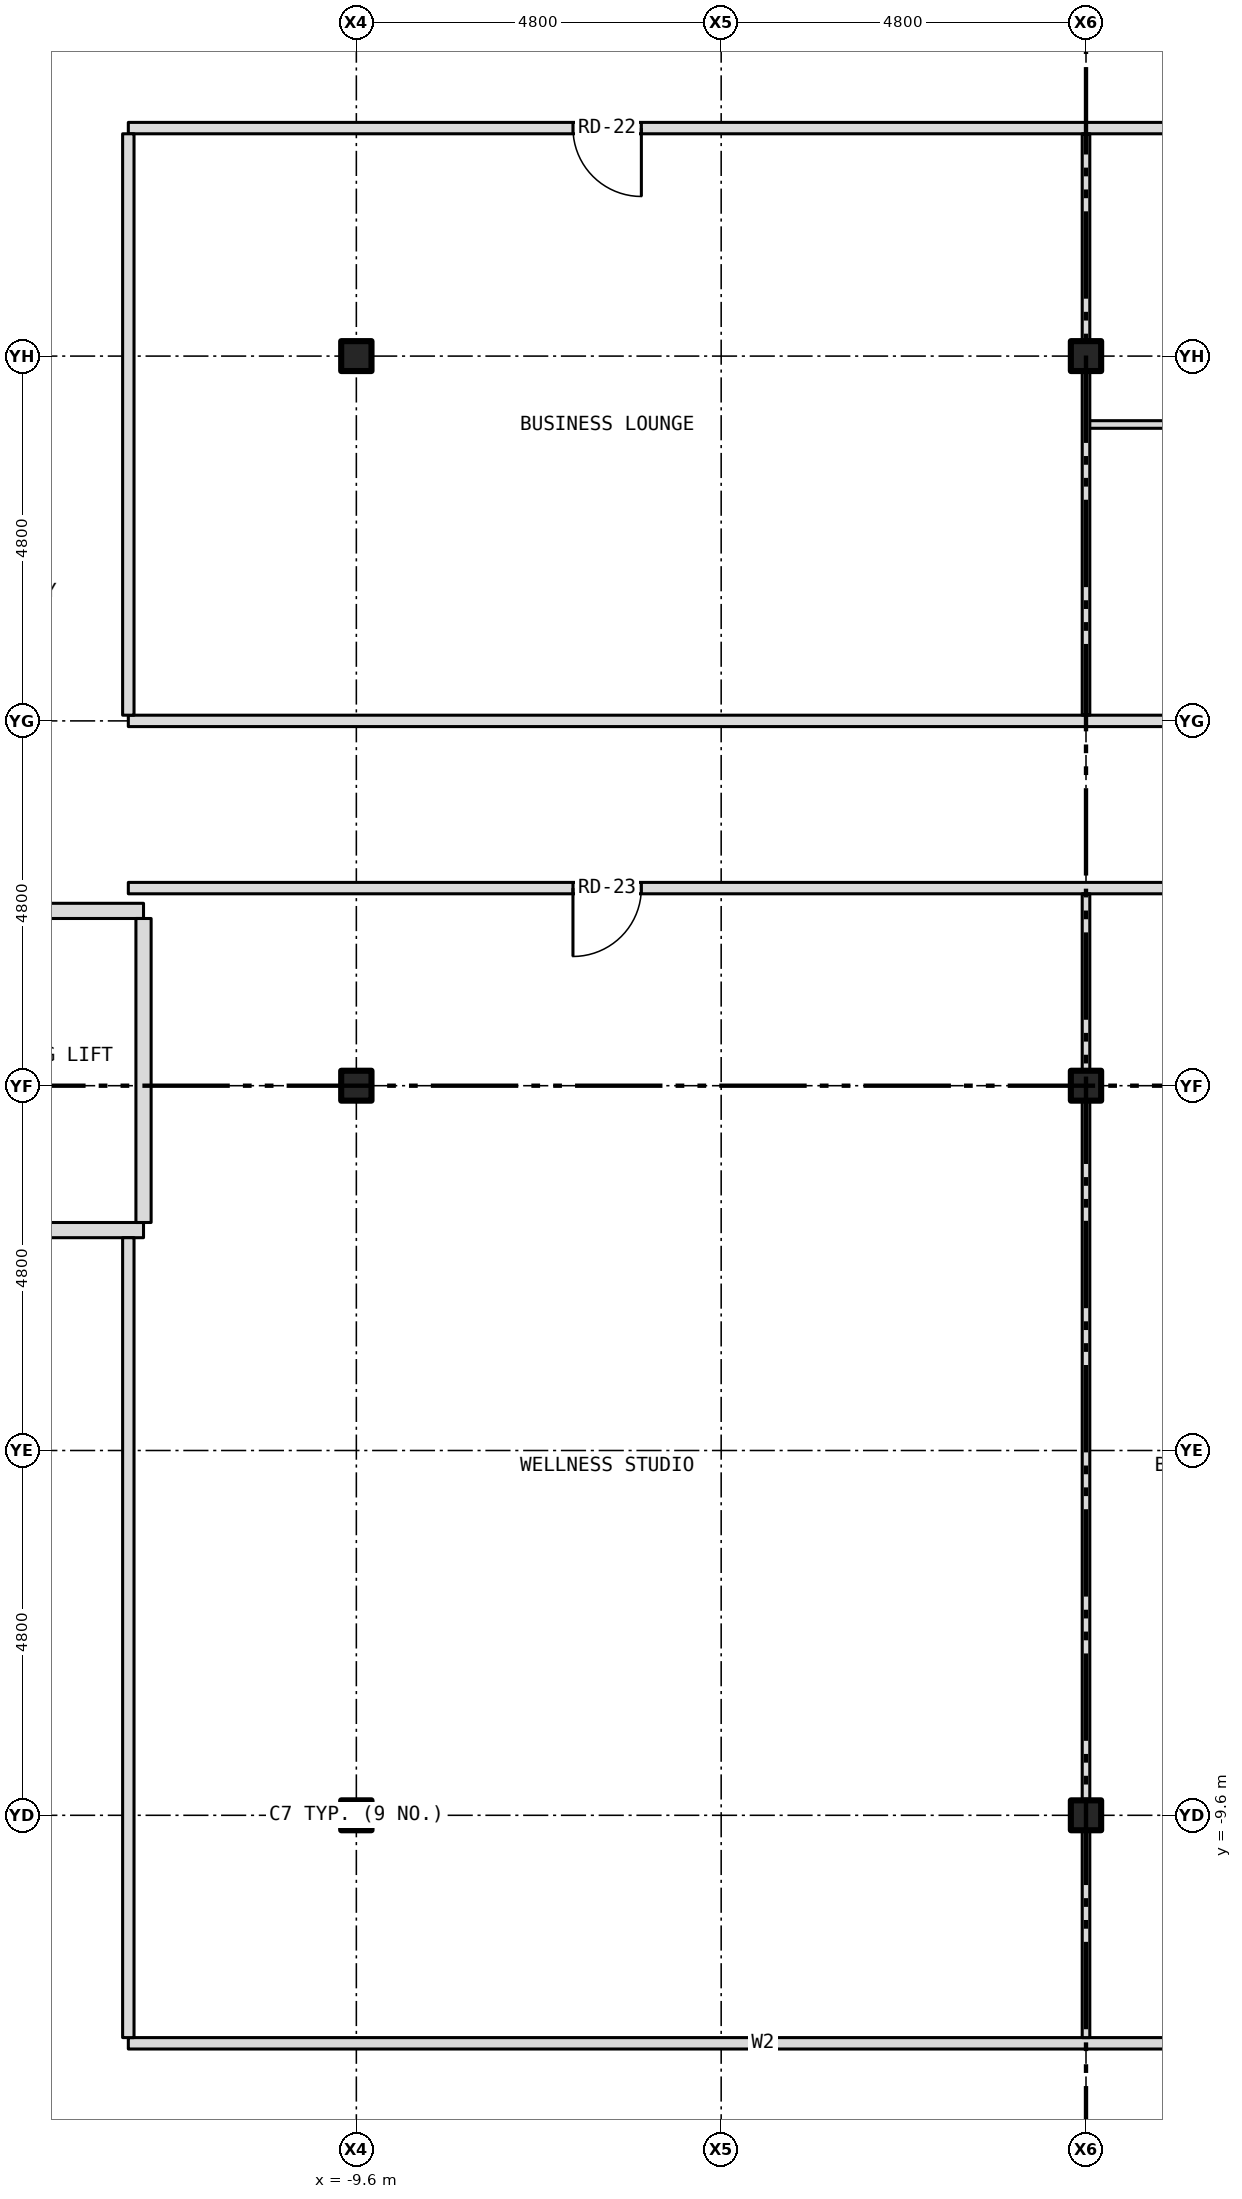
"""IFC4 building model, lengths in metres.
Left out: names, types, materials, properties, quantities, classifications, styles, units other than length and angle.
Written with IfcOpenShell. Run it as: python <this file> out.ifc"""

import sys

from ifc_helpers import new_model, si_unit, direction, frame, frame_2d, origin, origin_2d, place, context, subcontext, project, spatial, rectangle, i_section, extrude, element, fill, save


model = new_model("IFC4")
c1 = context("Model", 3, precision=1e-05, world=origin(), true_north=direction((0.0, 1.0)))
c2 = subcontext(c1, "Body", "Model", "MODEL_VIEW")
j1 = project(units=[si_unit("LENGTHUNIT", "METRE"), si_unit("PLANEANGLEUNIT", "RADIAN")], contexts=[c1])
p1 = place(None, origin())
s1 = spatial("IfcSite", under=j1, at=p1, CompositionType="ELEMENT")
p2 = place(p1, origin())
s2 = spatial("IfcBuilding", under=s1, at=p2, CompositionType="ELEMENT")
p3 = place(p2, frame((0.0, 0.0, 110.0)))
s3 = spatial("IfcBuildingStorey", under=s2, at=p3, CompositionType="ELEMENT", Elevation=110.0)
for number, where, z_axis, x_axis in (
    (1, (-9.6, -9.6, -0.15), (0.0, 0.0, 1.0), (1.0, 0.0, 0.0)),
    (2, (-9.6, 0.0, -0.15), (0.0, 0.0, 1.0), (1.0, 0.0, 0.0)),
    (3, (-9.6, 9.6, -0.15), (0.0, 0.0, 1.0), (1.0, 0.0, 0.0)),
    (4, (0.0, -9.6, -0.15), (0.0, 0.0, 1.0), (1.0, 0.0, 0.0)),
    (5, (0.0, 0.0, -0.15), (0.0, 0.0, 1.0), (1.0, 0.0, 0.0)),
    (6, (0.0, 9.6, -0.15), (0.0, 0.0, 1.0), (1.0, 0.0, 0.0)),
):
    element("IfcColumn", number, at=place(p3, frame(where, z_axis=z_axis, x_axis=x_axis)), inside=s3, PredefinedType="COLUMN", context=c2, shape_type="SweptSolid", body=[
        extrude(i_section(OverallWidth=0.399, OverallDepth=0.394, WebThickness=0.023, FlangeThickness=0.037, at=origin_2d()), origin(), (0.0, 0.0, 1.0), 3.5),
    ])
p4 = place(p3, frame((-12.6, -12.6, 0.0), z_axis=(0.0, 0.0, 1.0), x_axis=(1.0, 0.0, 0.0)))
e7 = element("IfcWall", 7, at=p4, inside=s3, PredefinedType="PARTITIONING", context=c2, shape_type="SweptSolid", body=[
    extrude(rectangle(XDim=16.7, YDim=0.15, at=frame_2d((8.35, 0.0))), origin(), (0.0, 0.0, 1.0), 3.35),
])
p5 = place(p3, frame((-15.68, -1.9, 0.0), z_axis=(0.0, 0.0, 1.0), x_axis=(1.0, 0.0, 0.0)))
e8 = element("IfcWall", 8, at=p5, inside=s3, PredefinedType="PARTITIONING", context=c2, shape_type="SweptSolid", body=[
    extrude(rectangle(XDim=3.28, YDim=0.2, at=frame_2d((1.64, 0.0))), origin(), (0.0, 0.0, 1.0), 3.35),
])
p6 = place(p5, frame((0.94, 0.0, 0.0)))
e9 = element("IfcOpeningElement", 9, at=p6, cuts=e8, PredefinedType="OPENING", context=c2, shape_type="SweptSolid", body=[
    extrude(rectangle(XDim=1.1, YDim=2.1, at=frame_2d((0.55, 1.05))), frame((0.0, 0.112, 0.0), z_axis=(0.0, -1.0, 0.0), x_axis=(1.0, 0.0, 0.0)), (0.0, 0.0, 1.0), 0.224),
])
p7 = place(p3, frame((-15.68, 2.3, 0.0), z_axis=(0.0, 0.0, 1.0), x_axis=(1.0, 0.0, 0.0)))
e10 = element("IfcWall", 10, at=p7, inside=s3, PredefinedType="PARTITIONING", context=c2, shape_type="SweptSolid", body=[
    extrude(rectangle(XDim=3.28, YDim=0.2, at=frame_2d((1.64, 0.0))), origin(), (0.0, 0.0, 1.0), 3.35),
])
p8 = place(p7, frame((0.84, 0.0, 0.0)))
e11 = element("IfcOpeningElement", 11, at=p8, cuts=e10, PredefinedType="OPENING", context=c2, shape_type="SweptSolid", body=[
    extrude(rectangle(XDim=1.1, YDim=2.1, at=frame_2d((0.55, 1.05))), frame((0.0, 0.112, 0.0), z_axis=(0.0, -1.0, 0.0), x_axis=(1.0, 0.0, 0.0)), (0.0, 0.0, 1.0), 0.224),
])
p9 = place(p3, frame((-12.6, 2.6, 0.0), z_axis=(0.0, 0.0, 1.0), x_axis=(1.0, 0.0, 0.0)))
e12 = element("IfcWall", 12, at=p9, inside=s3, PredefinedType="PARTITIONING", context=c2, shape_type="SweptSolid", body=[
    extrude(rectangle(XDim=16.7, YDim=0.15, at=frame_2d((8.35, 0.0))), origin(), (0.0, 0.0, 1.0), 3.35),
])
p10 = place(p9, frame((5.85, 0.0, 0.0)))
e13 = element("IfcOpeningElement", 13, at=p10, cuts=e12, PredefinedType="OPENING", context=c2, shape_type="SweptSolid", body=[
    extrude(rectangle(XDim=0.9, YDim=2.1, at=frame_2d((0.45, 1.05))), frame((0.0, 0.087, 0.0), z_axis=(0.0, -1.0, 0.0), x_axis=(1.0, 0.0, 0.0)), (0.0, 0.0, 1.0), 0.174),
])
p11 = place(p3, frame((-12.6, 4.8, 0.0), z_axis=(0.0, 0.0, 1.0), x_axis=(1.0, 0.0, 0.0)))
e14 = element("IfcWall", 14, at=p11, inside=s3, PredefinedType="PARTITIONING", context=c2, shape_type="SweptSolid", body=[
    extrude(rectangle(XDim=16.7, YDim=0.15, at=frame_2d((8.35, 0.0))), origin(), (0.0, 0.0, 1.0), 3.35),
])
p12 = place(p11, frame((14.2, 0.0, 0.0)))
e15 = element("IfcOpeningElement", 15, at=p12, cuts=e14, PredefinedType="OPENING", context=c2, shape_type="SweptSolid", body=[
    extrude(rectangle(XDim=0.9, YDim=2.1, at=frame_2d((0.45, 1.05))), frame((0.0, 0.087, 0.0), z_axis=(0.0, -1.0, 0.0), x_axis=(1.0, 0.0, 0.0)), (0.0, 0.0, 1.0), 0.174),
])
p13 = place(p3, frame((0.0, 8.7, 0.0), z_axis=(0.0, 0.0, 1.0), x_axis=(1.0, 0.0, 0.0)))
e16 = element("IfcWall", 16, at=p13, inside=s3, PredefinedType="PARTITIONING", context=c2, shape_type="SweptSolid", body=[
    extrude(rectangle(XDim=4.1, YDim=0.1, at=frame_2d((2.05, 0.0))), origin(), (0.0, 0.0, 1.0), 3.35),
])
p14 = place(p3, frame((-12.6, 12.6, 0.0), z_axis=(0.0, 0.0, 1.0), x_axis=(1.0, 0.0, 0.0)))
e17 = element("IfcWall", 17, at=p14, inside=s3, PredefinedType="PARTITIONING", context=c2, shape_type="SweptSolid", body=[
    extrude(rectangle(XDim=16.7, YDim=0.15, at=frame_2d((8.35, 0.0))), origin(), (0.0, 0.0, 1.0), 3.35),
])
p15 = place(p14, frame((14.2, 0.0, 0.0)))
e18 = element("IfcOpeningElement", 18, at=p15, cuts=e17, PredefinedType="OPENING", context=c2, shape_type="SweptSolid", body=[
    extrude(rectangle(XDim=0.9, YDim=2.1, at=frame_2d((0.45, 1.05))), frame((0.0, 0.087, 0.0), z_axis=(0.0, -1.0, 0.0), x_axis=(1.0, 0.0, 0.0)), (0.0, 0.0, 1.0), 0.174),
])
p16 = place(p14, frame((5.85, 0.0, 0.0)))
e19 = element("IfcOpeningElement", 19, at=p16, cuts=e17, PredefinedType="OPENING", context=c2, shape_type="SweptSolid", body=[
    extrude(rectangle(XDim=0.9, YDim=2.1, at=frame_2d((0.45, 1.05))), frame((0.0, 0.087, 0.0), z_axis=(0.0, -1.0, 0.0), x_axis=(1.0, 0.0, 0.0)), (0.0, 0.0, 1.0), 0.174),
])
p17 = place(p3, frame((-12.6, -12.525, 0.0), z_axis=(0.0, 0.0, 1.0), x_axis=(0.0, 1.0, 0.0)))
e20 = element("IfcWall", 20, at=p17, inside=s3, PredefinedType="PARTITIONING", context=c2, shape_type="SweptSolid", body=[
    extrude(rectangle(XDim=10.525, YDim=0.15, at=frame_2d((5.262, 0.0))), origin(), (0.0, 0.0, 1.0), 3.35),
])
p18 = place(p3, frame((-12.6, 4.875, 0.0), z_axis=(0.0, 0.0, 1.0), x_axis=(0.0, 1.0, 0.0)))
e21 = element("IfcWall", 21, at=p18, inside=s3, PredefinedType="PARTITIONING", context=c2, shape_type="SweptSolid", body=[
    extrude(rectangle(XDim=7.65, YDim=0.15, at=frame_2d((3.825, 0.0))), origin(), (0.0, 0.0, 1.0), 3.35),
])
p19 = place(p3, frame((-12.4, -1.8, 0.0), z_axis=(0.0, 0.0, 1.0), x_axis=(0.0, 1.0, 0.0)))
e22 = element("IfcWall", 22, at=p19, inside=s3, PredefinedType="PARTITIONING", context=c2, shape_type="SweptSolid", body=[
    extrude(rectangle(XDim=4.0, YDim=0.2, at=frame_2d((2.0, 0.0))), origin(), (0.0, 0.0, 1.0), 3.35),
])
p20 = place(p3, frame((0.0, -12.525, 0.0), z_axis=(0.0, 0.0, 1.0), x_axis=(0.0, 1.0, 0.0)))
e23 = element("IfcWall", 23, at=p20, inside=s3, PredefinedType="PARTITIONING", context=c2, shape_type="SweptSolid", body=[
    extrude(rectangle(XDim=2.726, YDim=0.1, at=frame_2d((1.363, 0.0))), origin(), (0.0, 0.0, 1.0), 2.728),
])
p21 = place(p3, frame((0.0, -9.799, 0.0), z_axis=(0.0, 0.0, 1.0), x_axis=(0.0, 1.0, 0.0)))
e24 = element("IfcWall", 24, at=p21, inside=s3, PredefinedType="PARTITIONING", context=c2, shape_type="SweptSolid", body=[
    extrude(rectangle(XDim=0.398, YDim=0.1, at=frame_2d((0.199, 0.0))), origin(), (0.0, 0.0, 1.0), 3.35),
])
p22 = place(p3, frame((0.0, -9.401, 0.0), z_axis=(0.0, 0.0, 1.0), x_axis=(0.0, 1.0, 0.0)))
e25 = element("IfcWall", 25, at=p22, inside=s3, PredefinedType="PARTITIONING", context=c2, shape_type="SweptSolid", body=[
    extrude(rectangle(XDim=9.202, YDim=0.1, at=frame_2d((4.601, 0.0))), origin(), (0.0, 0.0, 1.0), 2.728),
])
p23 = place(p3, frame((0.0, -0.199, 0.0), z_axis=(0.0, 0.0, 1.0), x_axis=(0.0, 1.0, 0.0)))
e26 = element("IfcWall", 26, at=p23, inside=s3, PredefinedType="PARTITIONING", context=c2, shape_type="SweptSolid", body=[
    extrude(rectangle(XDim=0.398, YDim=0.1, at=frame_2d((0.199, 0.0))), origin(), (0.0, 0.0, 1.0), 3.35),
])
p24 = place(p3, frame((0.0, 0.199, 0.0), z_axis=(0.0, 0.0, 1.0), x_axis=(0.0, 1.0, 0.0)))
e27 = element("IfcWall", 27, at=p24, inside=s3, PredefinedType="PARTITIONING", context=c2, shape_type="SweptSolid", body=[
    extrude(rectangle(XDim=2.326, YDim=0.1, at=frame_2d((1.163, 0.0))), origin(), (0.0, 0.0, 1.0), 2.728),
])
p25 = place(p3, frame((0.0, 4.875, 0.0), z_axis=(0.0, 0.0, 1.0), x_axis=(0.0, 1.0, 0.0)))
e28 = element("IfcWall", 28, at=p25, inside=s3, PredefinedType="PARTITIONING", context=c2, shape_type="SweptSolid", body=[
    extrude(rectangle(XDim=4.526, YDim=0.1, at=frame_2d((2.263, 0.0))), origin(), (0.0, 0.0, 1.0), 2.728),
])
p26 = place(p3, frame((0.0, 9.401, 0.0), z_axis=(0.0, 0.0, 1.0), x_axis=(0.0, 1.0, 0.0)))
e29 = element("IfcWall", 29, at=p26, inside=s3, PredefinedType="PARTITIONING", context=c2, shape_type="SweptSolid", body=[
    extrude(rectangle(XDim=0.398, YDim=0.1, at=frame_2d((0.199, 0.0))), origin(), (0.0, 0.0, 1.0), 3.35),
])
p27 = place(p3, frame((0.0, 9.799, 0.0), z_axis=(0.0, 0.0, 1.0), x_axis=(0.0, 1.0, 0.0)))
e30 = element("IfcWall", 30, at=p27, inside=s3, PredefinedType="PARTITIONING", context=c2, shape_type="SweptSolid", body=[
    extrude(rectangle(XDim=2.726, YDim=0.1, at=frame_2d((1.363, 0.0))), origin(), (0.0, 0.0, 1.0), 2.728),
])
p28 = place(p16, origin())
e31 = element("IfcDoor", 31, at=p28, inside=s3, OperationType="SINGLE_SWING_RIGHT", PredefinedType="DOOR", context=c2, shape_type="SweptSolid", body=[
    extrude(rectangle(XDim=0.9, YDim=2.1, at=frame_2d((0.45, 1.05))), frame((0.0, 0.025, 0.0), z_axis=(0.0, -1.0, 0.0), x_axis=(1.0, 0.0, 0.0)), (0.0, 0.0, 1.0), 0.05),
])
fill(e19, e31)
p29 = place(p10, origin())
e32 = element("IfcDoor", 32, at=p29, inside=s3, OperationType="SINGLE_SWING_LEFT", PredefinedType="DOOR", context=c2, shape_type="SweptSolid", body=[
    extrude(rectangle(XDim=0.9, YDim=2.1, at=frame_2d((0.45, 1.05))), frame((0.0, 0.025, 0.0), z_axis=(0.0, -1.0, 0.0), x_axis=(1.0, 0.0, 0.0)), (0.0, 0.0, 1.0), 0.05),
])
fill(e13, e32)
save(model, sys.argv[1])
